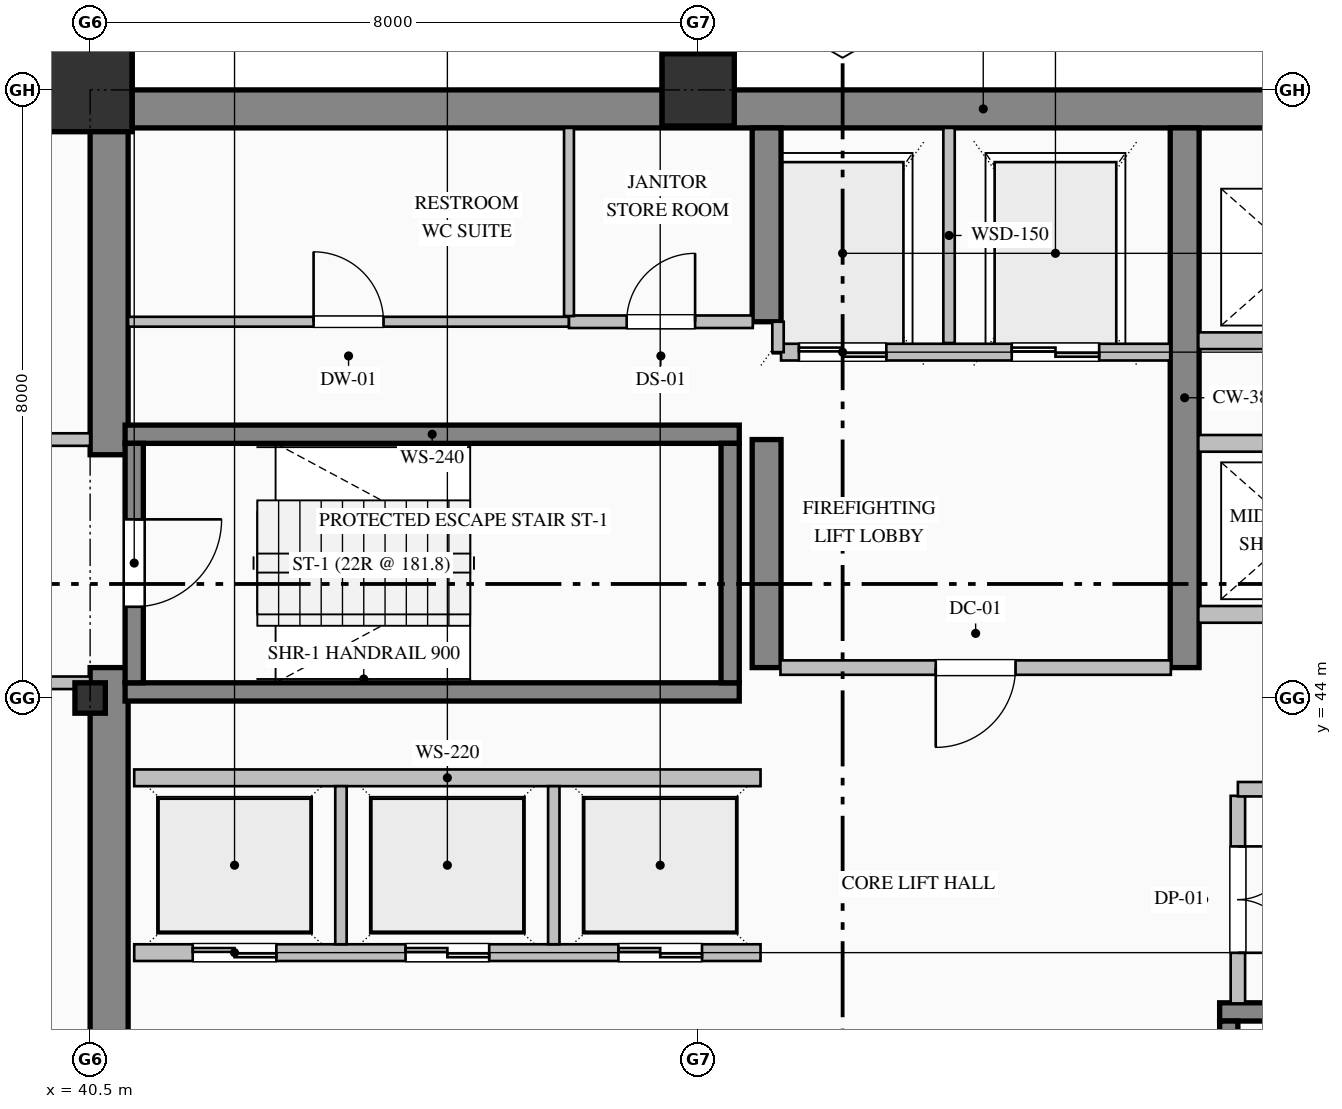
"""IFC4 building model, lengths in metres.
Left out: names, types, materials, properties, quantities, classifications, styles, units other than length and angle.
Written with IfcOpenShell. Run it as: python <this file> out.ifc"""

import sys

from ifc_helpers import new_model, si_unit, direction, frame, frame_2d, origin, origin_2d, place, context, subcontext, project, spatial, rectangle, hollow_rectangle, i_section, extrude, element, fill, save


model = new_model("IFC4")
c1 = context("Model", 3, precision=1e-05, world=origin(), true_north=direction((0.0, 1.0)))
c2 = subcontext(c1, "Body", "Model", "MODEL_VIEW")
j1 = project(units=[si_unit("LENGTHUNIT", "METRE"), si_unit("PLANEANGLEUNIT", "RADIAN")], contexts=[c1])
p1 = place(None, origin())
s1 = spatial("IfcSite", under=j1, at=p1, CompositionType="ELEMENT")
p2 = place(p1, origin())
s2 = spatial("IfcBuilding", under=s1, at=p2, CompositionType="ELEMENT")
p3 = place(p2, frame((0.0, 0.0, 143.0)))
s3 = spatial("IfcBuildingStorey", under=s2, at=p3, CompositionType="ELEMENT", Elevation=143.0)
p4 = place(p3, frame((40.5, 51.75, 0.0), z_axis=(0.0, 0.0, 1.0), x_axis=(1.0, 0.0, 0.0)))
e1 = element("IfcWall", 1, at=p4, inside=s3, PredefinedType="SHEAR", context=c2, shape_type="SweptSolid", body=[
    extrude(rectangle(XDim=23.5, YDim=0.5, at=frame_2d((11.75, 0.0))), origin(), (0.0, 0.0, 1.0), 3.765),
])
p5 = place(p3, frame((40.75, 36.5, 0.0), z_axis=(0.0, 0.0, 1.0), x_axis=(0.0, 1.0, 0.0)))
e2 = element("IfcWall", 2, at=p5, inside=s3, PredefinedType="SHEAR", context=c2, shape_type="SweptSolid", body=[
    extrude(rectangle(XDim=7.9, YDim=0.5, at=frame_2d((3.95, 0.0))), origin(), (0.0, 0.0, 1.0), 3.765),
])
p6 = place(p3, frame((40.75, 47.2, 0.0), z_axis=(0.0, 0.0, 1.0), x_axis=(0.0, 1.0, 0.0)))
e3 = element("IfcWall", 3, at=p6, inside=s3, PredefinedType="SHEAR", context=c2, shape_type="SweptSolid", body=[
    extrude(rectangle(XDim=4.3, YDim=0.5, at=frame_2d((2.15, 0.0))), origin(), (0.0, 0.0, 1.0), 3.765),
])
p7 = place(p3, frame((49.4, 44.4, 0.0), z_axis=(0.0, 0.0, 1.0), x_axis=(0.0, 1.0, 0.0)))
e4 = element("IfcWall", 4, at=p7, inside=s3, PredefinedType="SHEAR", context=c2, shape_type="SweptSolid", body=[
    extrude(rectangle(XDim=3.0, YDim=0.38, at=frame_2d((1.5, 0.0))), origin(), (0.0, 0.0, 1.0), 3.765),
])
p8 = place(p3, frame((49.4, 48.95, 0.0), z_axis=(0.0, 0.0, 1.0), x_axis=(0.0, 1.0, 0.0)))
e5 = element("IfcWall", 5, at=p8, inside=s3, PredefinedType="SHEAR", context=c2, shape_type="SweptSolid", body=[
    extrude(rectangle(XDim=2.55, YDim=0.38, at=frame_2d((1.275, 0.0))), origin(), (0.0, 0.0, 1.0), 3.765),
])
p9 = place(p3, frame((54.9, 44.4, 0.0), z_axis=(0.0, 0.0, 1.0), x_axis=(0.0, 1.0, 0.0)))
e6 = element("IfcWall", 6, at=p9, inside=s3, PredefinedType="SHEAR", context=c2, shape_type="SweptSolid", body=[
    extrude(rectangle(XDim=7.1, YDim=0.38, at=frame_2d((3.55, 0.0))), origin(), (0.0, 0.0, 1.0), 3.765),
])
p10 = place(p3, frame((40.5, 44.0, 0.0), z_axis=(0.0, 0.0, 1.0), x_axis=(1.0, 0.0, 0.0)))
e7 = element("IfcColumn", 7, at=p10, inside=s3, PredefinedType="COLUMN", context=c2, shape_type="SweptSolid", body=[
    extrude(i_section(OverallWidth=0.4, OverallDepth=0.4, WebThickness=0.013, FlangeThickness=0.021, FilletRadius=0.022, at=origin_2d()), origin(), (0.0, 0.0, 1.0), 4.0),
])
p11 = place(p3, frame((40.5, 52.0, 0.0), z_axis=(0.0, 0.0, 1.0), x_axis=(1.0, 0.0, 0.0)))
e8 = element("IfcColumn", 8, at=p11, inside=s3, PredefinedType="COLUMN", context=c2, shape_type="SweptSolid", body=[
    extrude(hollow_rectangle(XDim=1.1, YDim=1.1, WallThickness=0.04, at=origin_2d()), origin(), (0.0, 0.0, 1.0), 4.0),
])
p12 = place(p3, frame((48.5, 52.0, 0.0), z_axis=(0.0, 0.0, 1.0), x_axis=(1.0, 0.0, 0.0)))
e9 = element("IfcColumn", 9, at=p12, inside=s3, PredefinedType="COLUMN", context=c2, shape_type="SweptSolid", body=[
    extrude(hollow_rectangle(XDim=0.95, YDim=0.95, WallThickness=0.036, at=origin_2d()), origin(), (0.0, 0.0, 1.0), 4.0),
])
p13 = place(p3, frame((13.0, 51.83, 0.0), z_axis=(0.0, 0.0, 1.0), x_axis=(1.0, 0.0, 0.0)))
e10 = element("IfcWall", 10, at=p13, inside=s3, PredefinedType="SOLIDWALL", context=c2, shape_type="SweptSolid", body=[
    extrude(rectangle(XDim=27.52, YDim=0.34, at=frame_2d((13.76, 0.0))), origin(), (0.0, 0.0, 1.0), 3.265),
])
p14 = place(p13, frame((6.375, 0.0, 0.85)))
e11 = element("IfcOpeningElement", 11, at=p14, cuts=e10, PredefinedType="OPENING", context=c2, shape_type="SweptSolid", body=[
    extrude(rectangle(XDim=1.65, YDim=1.95, at=frame_2d((0.825, 0.975))), frame((0.0, 0.18, 0.0), z_axis=(0.0, -1.0, 0.0), x_axis=(1.0, 0.0, 0.0)), (0.0, 0.0, 1.0), 0.36),
])
p15 = place(p13, frame((13.65, 0.0, 0.85)))
e12 = element("IfcOpeningElement", 12, at=p15, cuts=e10, PredefinedType="OPENING", context=c2, shape_type="SweptSolid", body=[
    extrude(rectangle(XDim=1.5, YDim=1.95, at=frame_2d((0.75, 0.975))), frame((0.0, 0.18, 0.0), z_axis=(0.0, -1.0, 0.0), x_axis=(1.0, 0.0, 0.0)), (0.0, 0.0, 1.0), 0.36),
])
for number, where, z_axis, x_axis in (
    (13, (40.96, 47.47, 0.0), (0.0, 0.0, 1.0), (1.0, 0.0, 0.0)),
    (14, (49.04, 44.08, 0.0), (0.0, 0.0, 1.0), (-1.0, 0.0, 0.0)),
):
    element("IfcWall", number, at=place(p3, frame(where, z_axis=z_axis, x_axis=x_axis)), inside=s3, PredefinedType="SOLIDWALL", context=c2, shape_type="SweptSolid", body=[
        extrude(rectangle(XDim=8.08, YDim=0.24, at=frame_2d((4.04, 0.0))), origin(), (0.0, 0.0, 1.0), 4.0),
    ])
p16 = place(p3, frame((41.08, 47.35, 0.0), z_axis=(0.0, 0.0, 1.0), x_axis=(0.0, -1.0, 0.0)))
e15 = element("IfcWall", 15, at=p16, inside=s3, PredefinedType="SOLIDWALL", context=c2, shape_type="SweptSolid", body=[
    extrude(rectangle(XDim=3.15, YDim=0.24, at=frame_2d((1.575, 0.0))), origin(), (0.0, 0.0, 1.0), 4.0),
])
p17 = place(p16, frame((1.0, 0.0, 0.0)))
e16 = element("IfcOpeningElement", 16, at=p17, cuts=e15, PredefinedType="OPENING", context=c2, shape_type="SweptSolid", body=[
    extrude(rectangle(XDim=1.15, YDim=2.2, at=frame_2d((0.575, 1.1))), frame((0.0, 0.13, 0.0), z_axis=(0.0, -1.0, 0.0), x_axis=(1.0, 0.0, 0.0)), (0.0, 0.0, 1.0), 0.26),
])
p18 = place(p3, frame((48.92, 44.2, 0.0), z_axis=(0.0, 0.0, 1.0), x_axis=(0.0, 1.0, 0.0)))
e17 = element("IfcWall", 17, at=p18, inside=s3, PredefinedType="SOLIDWALL", context=c2, shape_type="SweptSolid", body=[
    extrude(rectangle(XDim=3.15, YDim=0.24, at=frame_2d((1.575, 0.0))), origin(), (0.0, 0.0, 1.0), 4.0),
])
p19 = place(p3, frame((55.36, 39.87, 0.0), z_axis=(0.0, 0.0, 1.0), x_axis=(1.0, 0.0, 0.0)))
e18 = element("IfcWall", 18, at=p19, inside=s3, PredefinedType="SOLIDWALL", context=c2, shape_type="SweptSolid", body=[
    extrude(rectangle(XDim=8.08, YDim=0.24, at=frame_2d((4.04, 0.0))), origin(), (0.0, 0.0, 1.0), 4.0),
])
p20 = place(p3, frame((55.48, 39.75, 0.0), z_axis=(0.0, 0.0, 1.0), x_axis=(0.0, -1.0, 0.0)))
e19 = element("IfcWall", 19, at=p20, inside=s3, PredefinedType="SOLIDWALL", context=c2, shape_type="SweptSolid", body=[
    extrude(rectangle(XDim=3.15, YDim=0.24, at=frame_2d((1.575, 0.0))), origin(), (0.0, 0.0, 1.0), 4.0),
])
p21 = place(p20, frame((1.0, 0.0, 0.0)))
e20 = element("IfcOpeningElement", 20, at=p21, cuts=e19, PredefinedType="OPENING", context=c2, shape_type="SweptSolid", body=[
    extrude(rectangle(XDim=1.15, YDim=2.2, at=frame_2d((0.575, 1.1))), frame((0.0, 0.13, 0.0), z_axis=(0.0, -1.0, 0.0), x_axis=(1.0, 0.0, 0.0)), (0.0, 0.0, 1.0), 0.26),
])
p22 = place(p3, frame((54.71, 48.55, 0.0), z_axis=(0.0, 0.0, 1.0), x_axis=(-1.0, 0.0, 0.0)))
e21 = element("IfcWall", 21, at=p22, inside=s3, PredefinedType="PARTITIONING", context=c2, shape_type="SweptSolid", body=[
    extrude(rectangle(XDim=5.12, YDim=0.22, at=frame_2d((2.56, 0.0))), origin(), (0.0, 0.0, 1.0), 3.765),
])
p23 = place(p22, frame((3.735, 0.0, 0.0)))
e22 = element("IfcOpeningElement", 22, at=p23, cuts=e21, PredefinedType="OPENING", context=c2, shape_type="SweptSolid", body=[
    extrude(rectangle(XDim=1.15, YDim=2.2, at=frame_2d((0.575, 1.1))), frame((0.0, 0.12, 0.0), z_axis=(0.0, -1.0, 0.0), x_axis=(1.0, 0.0, 0.0)), (0.0, 0.0, 1.0), 0.24),
])
p24 = place(p22, frame((0.935, 0.0, 0.0)))
e23 = element("IfcOpeningElement", 23, at=p24, cuts=e21, PredefinedType="OPENING", context=c2, shape_type="SweptSolid", body=[
    extrude(rectangle(XDim=1.15, YDim=2.2, at=frame_2d((0.575, 1.1))), frame((0.0, 0.12, 0.0), z_axis=(0.0, -1.0, 0.0), x_axis=(1.0, 0.0, 0.0)), (0.0, 0.0, 1.0), 0.24),
])
p25 = place(p3, frame((51.8, 48.67, 0.0), z_axis=(0.0, 0.0, 1.0), x_axis=(0.0, 1.0, 0.0)))
e24 = element("IfcWall", 24, at=p25, inside=s3, PredefinedType="PARTITIONING", context=c2, shape_type="SweptSolid", body=[
    extrude(rectangle(XDim=2.83, YDim=0.15, at=frame_2d((1.415, 0.0))), origin(), (0.0, 0.0, 1.0), 3.765),
])
p26 = place(p3, frame((49.55, 48.55, 0.0), z_axis=(0.0, 0.0, 1.0), x_axis=(0.0, 1.0, 0.0)))
e25 = element("IfcWall", 25, at=p26, inside=s3, PredefinedType="PARTITIONING", context=c2, shape_type="SweptSolid", body=[
    extrude(rectangle(XDim=0.4, YDim=0.15, at=frame_2d((0.2, 0.0))), origin(), (0.0, 0.0, 1.0), 3.765),
])
p27 = place(p3, frame((49.32, 40.65, 0.0), z_axis=(0.0, 0.0, 1.0), x_axis=(-1.0, 0.0, 0.0)))
e26 = element("IfcWall", 26, at=p27, inside=s3, PredefinedType="PARTITIONING", context=c2, shape_type="SweptSolid", body=[
    extrude(rectangle(XDim=8.24, YDim=0.22, at=frame_2d((4.12, 0.0))), origin(), (0.0, 0.0, 1.0), 3.765),
])
p28 = place(p27, frame((6.37, 0.0, 0.0)))
e27 = element("IfcOpeningElement", 27, at=p28, cuts=e26, PredefinedType="OPENING", context=c2, shape_type="SweptSolid", body=[
    extrude(rectangle(XDim=1.1, YDim=2.2, at=frame_2d((0.55, 1.1))), frame((0.0, 0.12, 0.0), z_axis=(0.0, -1.0, 0.0), x_axis=(1.0, 0.0, 0.0)), (0.0, 0.0, 1.0), 0.24),
])
p29 = place(p27, frame((3.57, 0.0, 0.0)))
e28 = element("IfcOpeningElement", 28, at=p29, cuts=e26, PredefinedType="OPENING", context=c2, shape_type="SweptSolid", body=[
    extrude(rectangle(XDim=1.1, YDim=2.2, at=frame_2d((0.55, 1.1))), frame((0.0, 0.12, 0.0), z_axis=(0.0, -1.0, 0.0), x_axis=(1.0, 0.0, 0.0)), (0.0, 0.0, 1.0), 0.24),
])
p30 = place(p27, frame((0.77, 0.0, 0.0)))
e29 = element("IfcOpeningElement", 29, at=p30, cuts=e26, PredefinedType="OPENING", context=c2, shape_type="SweptSolid", body=[
    extrude(rectangle(XDim=1.1, YDim=2.2, at=frame_2d((0.55, 1.1))), frame((0.0, 0.12, 0.0), z_axis=(0.0, -1.0, 0.0), x_axis=(1.0, 0.0, 0.0)), (0.0, 0.0, 1.0), 0.24),
])
p31 = place(p3, frame((41.08, 42.95, 0.0), z_axis=(0.0, 0.0, 1.0), x_axis=(1.0, 0.0, 0.0)))
e30 = element("IfcWall", 30, at=p31, inside=s3, PredefinedType="PARTITIONING", context=c2, shape_type="SweptSolid", body=[
    extrude(rectangle(XDim=8.24, YDim=0.22, at=frame_2d((4.12, 0.0))), origin(), (0.0, 0.0, 1.0), 3.765),
])
for number, where, z_axis, x_axis in (
    (31, (43.8, 40.76, 0.0), (0.0, 0.0, 1.0), (0.0, 1.0, 0.0)),
    (32, (46.6, 40.76, 0.0), (0.0, 0.0, 1.0), (0.0, 1.0, 0.0)),
):
    element("IfcWall", number, at=place(p3, frame(where, z_axis=z_axis, x_axis=x_axis)), inside=s3, PredefinedType="PARTITIONING", context=c2, shape_type="SweptSolid", body=[
        extrude(rectangle(XDim=2.08, YDim=0.15, at=frame_2d((1.04, 0.0))), origin(), (0.0, 0.0, 1.0), 3.765),
    ])
for number, where, z_axis, x_axis in (
    (33, (63.32, 45.1, 0.0), (0.0, 0.0, 1.0), (-1.0, 0.0, 0.0)),
    (34, (55.08, 47.35, 0.0), (0.0, 0.0, 1.0), (1.0, 0.0, 0.0)),
    (35, (63.32, 48.7, 0.0), (0.0, 0.0, 1.0), (-1.0, 0.0, 0.0)),
):
    element("IfcWall", number, at=place(p3, frame(where, z_axis=z_axis, x_axis=x_axis)), inside=s3, PredefinedType="PARTITIONING", context=c2, shape_type="SweptSolid", body=[
        extrude(rectangle(XDim=8.24, YDim=0.22, at=frame_2d((4.12, 0.0))), origin(), (0.0, 0.0, 1.0), 3.765),
    ])
p32 = place(p3, frame((37.8, 47.4, 0.0), z_axis=(0.0, 0.0, 1.0), x_axis=(1.0, 0.0, 0.0)))
e36 = element("IfcWall", 36, at=p32, inside=s3, PredefinedType="PARTITIONING", context=c2, shape_type="SweptSolid", body=[
    extrude(rectangle(XDim=2.7, YDim=0.165, at=frame_2d((1.35, 0.0))), origin(), (0.0, 0.0, 1.0), 3.765),
])
p33 = place(p32, frame((0.825, 0.0, 0.0)))
e37 = element("IfcOpeningElement", 37, at=p33, cuts=e36, PredefinedType="OPENING", context=c2, shape_type="SweptSolid", body=[
    extrude(rectangle(XDim=1.05, YDim=2.15, at=frame_2d((0.525, 1.075))), frame((0.0, 0.093, 0.0), z_axis=(0.0, -1.0, 0.0), x_axis=(1.0, 0.0, 0.0)), (0.0, 0.0, 1.0), 0.185),
])
p34 = place(p3, frame((40.5, 44.2, 0.0), z_axis=(0.0, 0.0, 1.0), x_axis=(-1.0, 0.0, 0.0)))
e38 = element("IfcWall", 38, at=p34, inside=s3, PredefinedType="PARTITIONING", context=c2, shape_type="SweptSolid", body=[
    extrude(rectangle(XDim=2.7, YDim=0.165, at=frame_2d((1.35, 0.0))), origin(), (0.0, 0.0, 1.0), 3.765),
])
p35 = place(p34, frame((0.825, 0.0, 0.0)))
e39 = element("IfcOpeningElement", 39, at=p35, cuts=e38, PredefinedType="OPENING", context=c2, shape_type="SweptSolid", body=[
    extrude(rectangle(XDim=1.05, YDim=2.15, at=frame_2d((0.525, 1.075))), frame((0.0, 0.093, 0.0), z_axis=(0.0, -1.0, 0.0), x_axis=(1.0, 0.0, 0.0)), (0.0, 0.0, 1.0), 0.185),
])
p36 = place(p3, frame((41.0, 48.95, 0.0), z_axis=(0.0, 0.0, 1.0), x_axis=(1.0, 0.0, 0.0)))
e40 = element("IfcWall", 40, at=p36, inside=s3, PredefinedType="PARTITIONING", context=c2, shape_type="SweptSolid", body=[
    extrude(rectangle(XDim=5.8, YDim=0.13, at=frame_2d((2.9, 0.0))), origin(), (0.0, 0.0, 1.0), 3.765),
])
p37 = place(p36, frame((2.44, 0.0, 0.0)))
e41 = element("IfcOpeningElement", 41, at=p37, cuts=e40, PredefinedType="OPENING", context=c2, shape_type="SweptSolid", body=[
    extrude(rectangle(XDim=0.92, YDim=2.15, at=frame_2d((0.46, 1.075))), frame((0.0, 0.075, 0.0), z_axis=(0.0, -1.0, 0.0), x_axis=(1.0, 0.0, 0.0)), (0.0, 0.0, 1.0), 0.15),
])
p38 = place(p3, frame((46.8, 48.95, 0.0), z_axis=(0.0, 0.0, 1.0), x_axis=(1.0, 0.0, 0.0)))
e42 = element("IfcWall", 42, at=p38, inside=s3, PredefinedType="PARTITIONING", context=c2, shape_type="SweptSolid", body=[
    extrude(rectangle(XDim=2.418, YDim=0.165, at=frame_2d((1.209, 0.0))), origin(), (0.0, 0.0, 1.0), 3.765),
])
p39 = place(p38, frame((0.759, 0.0, 0.0)))
e43 = element("IfcOpeningElement", 43, at=p39, cuts=e42, PredefinedType="OPENING", context=c2, shape_type="SweptSolid", body=[
    extrude(rectangle(XDim=0.9, YDim=2.15, at=frame_2d((0.45, 1.075))), frame((0.0, 0.093, 0.0), z_axis=(0.0, -1.0, 0.0), x_axis=(1.0, 0.0, 0.0)), (0.0, 0.0, 1.0), 0.185),
])
p40 = place(p3, frame((54.718, 44.4, 0.0), z_axis=(0.0, 0.0, 1.0), x_axis=(-1.0, 0.0, 0.0)))
e44 = element("IfcWall", 44, at=p40, inside=s3, PredefinedType="PARTITIONING", context=c2, shape_type="SweptSolid", body=[
    extrude(rectangle(XDim=5.136, YDim=0.19, at=frame_2d((2.568, 0.0))), origin(), (0.0, 0.0, 1.0), 3.765),
])
p41 = place(p40, frame((2.043, 0.0, 0.0)))
e45 = element("IfcOpeningElement", 45, at=p41, cuts=e44, PredefinedType="OPENING", context=c2, shape_type="SweptSolid", body=[
    extrude(rectangle(XDim=1.05, YDim=2.15, at=frame_2d((0.525, 1.075))), frame((0.0, 0.105, 0.0), z_axis=(0.0, -1.0, 0.0), x_axis=(1.0, 0.0, 0.0)), (0.0, 0.0, 1.0), 0.21),
])
p42 = place(p3, frame((55.6, 42.713, 0.0), z_axis=(0.0, 0.0, 1.0), x_axis=(0.0, -1.0, 0.0)))
e46 = element("IfcWall", 46, at=p42, inside=s3, PredefinedType="PARTITIONING", context=c2, shape_type="SweptSolid", body=[
    extrude(rectangle(XDim=2.731, YDim=0.19, at=frame_2d((1.365, 0.0))), origin(), (0.0, 0.0, 1.0), 3.765),
])
p43 = place(p42, frame((0.666, 0.0, 0.0)))
e47 = element("IfcOpeningElement", 47, at=p43, cuts=e46, PredefinedType="OPENING", context=c2, shape_type="SweptSolid", body=[
    extrude(rectangle(XDim=1.4, YDim=2.25, at=frame_2d((0.7, 1.125))), frame((0.0, 0.105, 0.0), z_axis=(0.0, -1.0, 0.0), x_axis=(1.0, 0.0, 0.0)), (0.0, 0.0, 1.0), 0.21),
])
p44 = place(p3, frame((58.2, 42.8, 0.0), z_axis=(0.0, 0.0, 1.0), x_axis=(-1.0, 0.0, 0.0)))
e48 = element("IfcWall", 48, at=p44, inside=s3, PredefinedType="PARTITIONING", context=c2, shape_type="SweptSolid", body=[
    extrude(rectangle(XDim=2.6, YDim=0.19, at=frame_2d((1.3, 0.0))), origin(), (0.0, 0.0, 1.0), 3.765),
])
p45 = place(p3, frame((46.8, 51.5, 0.0), z_axis=(0.0, 0.0, 1.0), x_axis=(0.0, -1.0, 0.0)))
e49 = element("IfcWall", 49, at=p45, inside=s3, PredefinedType="PARTITIONING", context=c2, shape_type="SweptSolid", body=[
    extrude(rectangle(XDim=2.476, YDim=0.13, at=frame_2d((1.238, 0.0))), origin(), (0.0, 0.0, 1.0), 3.765),
])
p46 = place(p17, origin())
e50 = element("IfcDoor", 50, at=p46, inside=s3, OperationType="SINGLE_SWING_LEFT", PredefinedType="DOOR", context=c2, shape_type="SweptSolid", body=[
    extrude(rectangle(XDim=1.15, YDim=2.2, at=frame_2d((0.575, 1.1))), frame((0.0, 0.025, 0.0), z_axis=(0.0, -1.0, 0.0), x_axis=(1.0, 0.0, 0.0)), (0.0, 0.0, 1.0), 0.05),
])
fill(e16, e50)
p47 = place(p23, origin())
e51 = element("IfcDoor", 51, at=p47, inside=s3, OperationType="DOUBLE_DOOR_SLIDING", PredefinedType="DOOR", context=c2, shape_type="SweptSolid", body=[
    extrude(rectangle(XDim=1.15, YDim=2.2, at=frame_2d((0.575, 1.1))), frame((0.0, 0.025, 0.0), z_axis=(0.0, -1.0, 0.0), x_axis=(1.0, 0.0, 0.0)), (0.0, 0.0, 1.0), 0.05),
])
fill(e22, e51)
p48 = place(p24, origin())
e52 = element("IfcDoor", 52, at=p48, inside=s3, OperationType="DOUBLE_DOOR_SLIDING", PredefinedType="DOOR", context=c2, shape_type="SweptSolid", body=[
    extrude(rectangle(XDim=1.15, YDim=2.2, at=frame_2d((0.575, 1.1))), frame((0.0, 0.025, 0.0), z_axis=(0.0, -1.0, 0.0), x_axis=(1.0, 0.0, 0.0)), (0.0, 0.0, 1.0), 0.05),
])
fill(e23, e52)
p49 = place(p28, origin())
e53 = element("IfcDoor", 53, at=p49, inside=s3, OperationType="DOUBLE_DOOR_SLIDING", PredefinedType="DOOR", context=c2, shape_type="SweptSolid", body=[
    extrude(rectangle(XDim=1.1, YDim=2.2, at=frame_2d((0.55, 1.1))), frame((0.0, 0.025, 0.0), z_axis=(0.0, -1.0, 0.0), x_axis=(1.0, 0.0, 0.0)), (0.0, 0.0, 1.0), 0.05),
])
fill(e27, e53)
p50 = place(p29, origin())
e54 = element("IfcDoor", 54, at=p50, inside=s3, OperationType="DOUBLE_DOOR_SLIDING", PredefinedType="DOOR", context=c2, shape_type="SweptSolid", body=[
    extrude(rectangle(XDim=1.1, YDim=2.2, at=frame_2d((0.55, 1.1))), frame((0.0, 0.025, 0.0), z_axis=(0.0, -1.0, 0.0), x_axis=(1.0, 0.0, 0.0)), (0.0, 0.0, 1.0), 0.05),
])
fill(e28, e54)
p51 = place(p30, origin())
e55 = element("IfcDoor", 55, at=p51, inside=s3, OperationType="DOUBLE_DOOR_SLIDING", PredefinedType="DOOR", context=c2, shape_type="SweptSolid", body=[
    extrude(rectangle(XDim=1.1, YDim=2.2, at=frame_2d((0.55, 1.1))), frame((0.0, 0.025, 0.0), z_axis=(0.0, -1.0, 0.0), x_axis=(1.0, 0.0, 0.0)), (0.0, 0.0, 1.0), 0.05),
])
fill(e29, e55)
p52 = place(p41, origin())
e56 = element("IfcDoor", 56, at=p52, inside=s3, OperationType="SINGLE_SWING_RIGHT", PredefinedType="DOOR", context=c2, shape_type="SweptSolid", body=[
    extrude(rectangle(XDim=1.05, YDim=2.15, at=frame_2d((0.525, 1.075))), frame((0.0, 0.025, 0.0), z_axis=(0.0, -1.0, 0.0), x_axis=(1.0, 0.0, 0.0)), (0.0, 0.0, 1.0), 0.05),
])
fill(e45, e56)
p53 = place(p37, origin())
e57 = element("IfcDoor", 57, at=p53, inside=s3, OperationType="SINGLE_SWING_LEFT", PredefinedType="DOOR", context=c2, shape_type="SweptSolid", body=[
    extrude(rectangle(XDim=0.92, YDim=2.15, at=frame_2d((0.46, 1.075))), frame((0.0, 0.025, 0.0), z_axis=(0.0, -1.0, 0.0), x_axis=(1.0, 0.0, 0.0)), (0.0, 0.0, 1.0), 0.05),
])
fill(e41, e57)
p54 = place(p39, origin())
e58 = element("IfcDoor", 58, at=p54, inside=s3, OperationType="SINGLE_SWING_RIGHT", PredefinedType="DOOR", context=c2, shape_type="SweptSolid", body=[
    extrude(rectangle(XDim=0.9, YDim=2.15, at=frame_2d((0.45, 1.075))), frame((0.0, 0.025, 0.0), z_axis=(0.0, -1.0, 0.0), x_axis=(1.0, 0.0, 0.0)), (0.0, 0.0, 1.0), 0.05),
])
fill(e43, e58)
p55 = place(p43, origin())
e59 = element("IfcDoor", 59, at=p55, inside=s3, OperationType="DOUBLE_DOOR_SINGLE_SWING", PredefinedType="DOOR", context=c2, shape_type="SweptSolid", body=[
    extrude(rectangle(XDim=1.4, YDim=2.25, at=frame_2d((0.7, 1.125))), frame((0.0, 0.025, 0.0), z_axis=(0.0, -1.0, 0.0), x_axis=(1.0, 0.0, 0.0)), (0.0, 0.0, 1.0), 0.05),
])
fill(e47, e59)
save(model, sys.argv[1])
